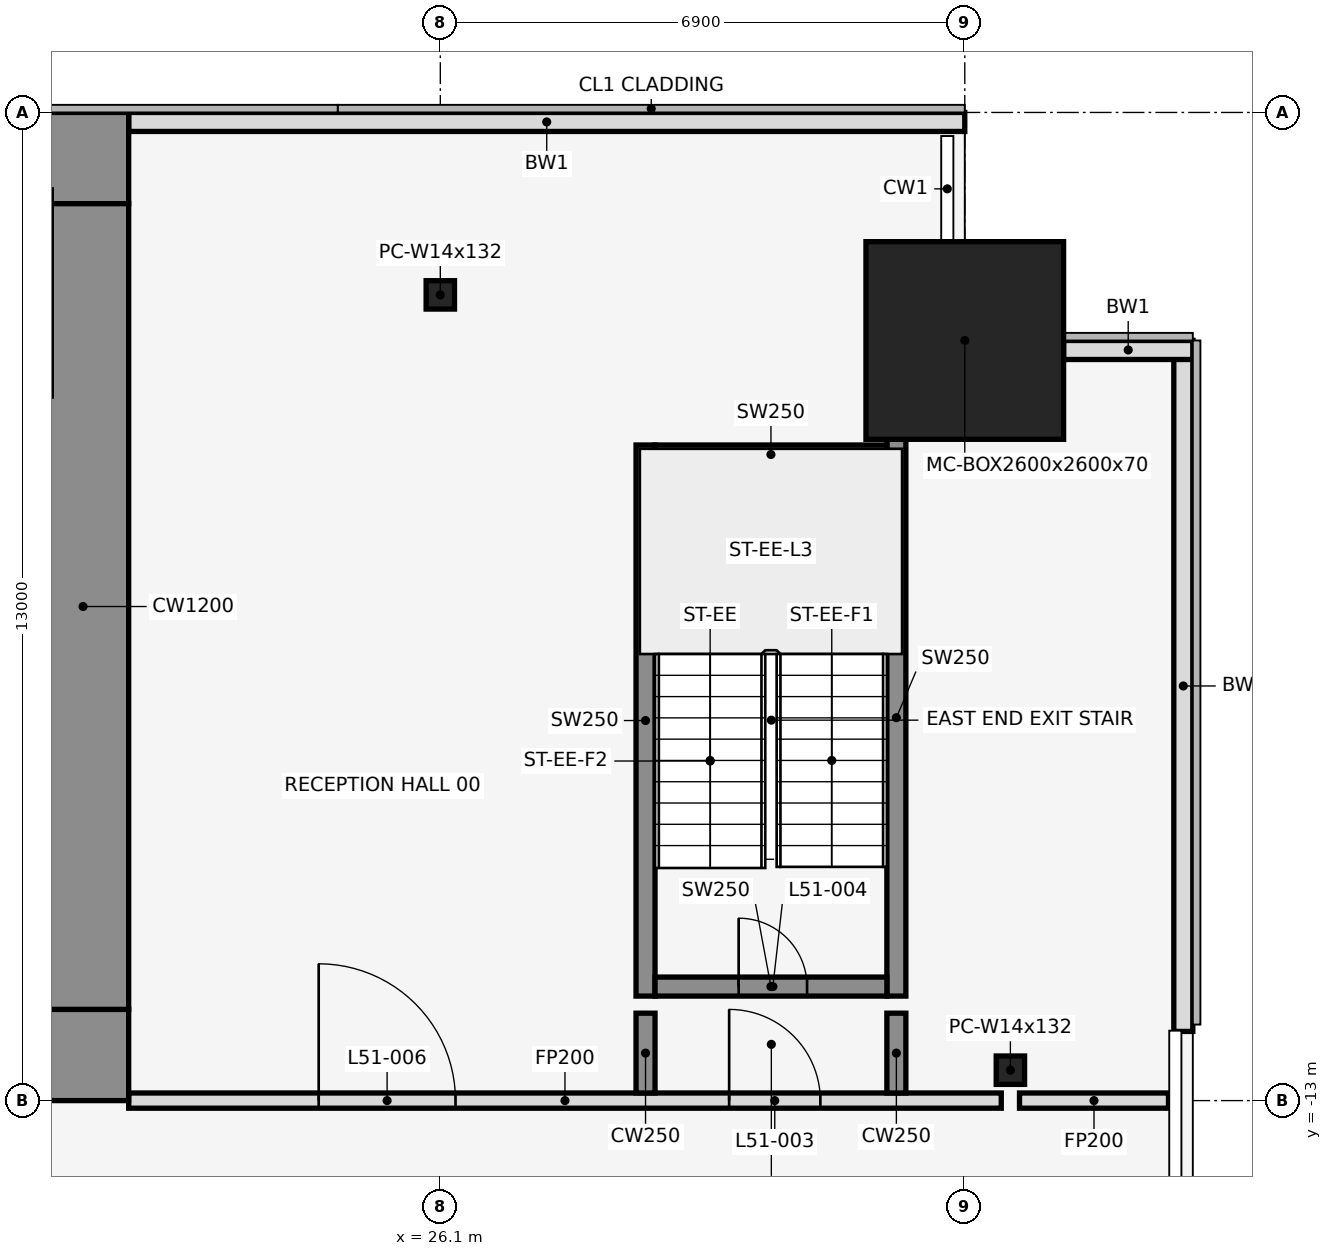
"""IFC4 building model, lengths in metres.
Left out: names, types, materials, properties, quantities, classifications, styles, units other than length and angle.
Written with IfcOpenShell. Run it as: python <this file> out.ifc"""

import sys

from ifc_helpers import new_model, si_unit, direction, frame, frame_2d, origin, origin_2d, place, context, subcontext, project, spatial, rectangle, hollow_rectangle, i_section, extrude, element, fill, save


model = new_model("IFC4")
c1 = context("Model", 3, precision=1e-05, world=origin(), true_north=direction((0.0, 1.0)))
c2 = subcontext(c1, "Body", "Model", "MODEL_VIEW")
j1 = project(units=[si_unit("LENGTHUNIT", "METRE"), si_unit("PLANEANGLEUNIT", "RADIAN")], contexts=[c1])
p1 = place(None, origin())
s1 = spatial("IfcSite", under=j1, at=p1, CompositionType="ELEMENT")
p2 = place(p1, origin())
s2 = spatial("IfcBuilding", under=s1, at=p2, CompositionType="ELEMENT")
p3 = place(p2, frame((0.0, 0.0, 227.8)))
s3 = spatial("IfcBuildingStorey", under=s2, at=p3, CompositionType="ELEMENT", Elevation=227.8)
p4 = place(p3, frame((26.1, -2.4, 0.0), z_axis=(0.0, 0.0, 1.0), x_axis=(1.0, 0.0, 0.0)))
e1 = element("IfcColumn", 1, at=p4, inside=s3, PredefinedType="COLUMN", context=c2, shape_type="SweptSolid", body=[
    extrude(i_section(OverallWidth=0.373, OverallDepth=0.373, WebThickness=0.016, FlangeThickness=0.026, at=origin_2d()), origin(), (0.0, 0.0, 1.0), 4.1),
])
p5 = place(p3, frame((33.0, -3.0, 0.0), z_axis=(0.0, 0.0, 1.0), x_axis=(1.0, 0.0, 0.0)))
e2 = element("IfcColumn", 2, at=p5, inside=s3, PredefinedType="COLUMN", context=c2, shape_type="SweptSolid", body=[
    extrude(hollow_rectangle(XDim=2.6, YDim=2.6, WallThickness=0.07, at=origin_2d()), origin(), (0.0, 0.0, 1.0), 4.1),
])
p6 = place(p3, frame((33.6, -12.6, 0.0), z_axis=(0.0, 0.0, 1.0), x_axis=(1.0, 0.0, 0.0)))
e3 = element("IfcColumn", 3, at=p6, inside=s3, PredefinedType="COLUMN", context=c2, shape_type="SweptSolid", body=[
    extrude(i_section(OverallWidth=0.373, OverallDepth=0.373, WebThickness=0.016, FlangeThickness=0.026, at=origin_2d()), origin(), (0.0, 0.0, 1.0), 4.1),
])
p7 = place(p3, frame((33.0, -0.125, 0.0), z_axis=(0.0, 0.0, 1.0), x_axis=(-1.0, 0.0, 0.0)))
e4 = element("IfcWall", 4, at=p7, inside=s3, PredefinedType="STANDARD", context=c2, shape_type="SweptSolid", body=[
    extrude(rectangle(XDim=11.0, YDim=0.25, at=frame_2d((5.5, 0.0))), origin(), (0.0, 0.0, 1.0), 3.95),
])
p8 = place(p3, frame((35.875, -12.09, 0.0), z_axis=(0.0, 0.0, 1.0), x_axis=(0.0, 1.0, 0.0)))
e5 = element("IfcWall", 5, at=p8, inside=s3, PredefinedType="STANDARD", context=c2, shape_type="SweptSolid", body=[
    extrude(rectangle(XDim=9.09, YDim=0.25, at=frame_2d((4.545, 0.0))), origin(), (0.0, 0.0, 1.0), 3.95),
])
p9 = place(p3, frame((36.0, -3.125, 0.0), z_axis=(0.0, 0.0, 1.0), x_axis=(-1.0, 0.0, 0.0)))
e6 = element("IfcWall", 6, at=p9, inside=s3, PredefinedType="STANDARD", context=c2, shape_type="SweptSolid", body=[
    extrude(rectangle(XDim=1.7, YDim=0.25, at=frame_2d((0.85, 0.0))), origin(), (0.0, 0.0, 1.0), 3.95),
])
p10 = place(p3, frame((28.8, -11.625, 0.0), z_axis=(0.0, 0.0, 1.0), x_axis=(0.0, 1.0, 0.0)))
e7 = element("IfcWall", 7, at=p10, inside=s3, PredefinedType="SHEAR", context=c2, shape_type="SweptSolid", body=[
    extrude(rectangle(XDim=7.25, YDim=0.25, at=frame_2d((3.625, 0.0))), origin(), (0.0, 0.0, 1.0), 4.1),
])
p11 = place(p3, frame((32.1, -11.625, 0.0), z_axis=(0.0, 0.0, 1.0), x_axis=(0.0, 1.0, 0.0)))
e8 = element("IfcWall", 8, at=p11, inside=s3, PredefinedType="SHEAR", context=c2, shape_type="SweptSolid", body=[
    extrude(rectangle(XDim=7.325, YDim=0.25, at=frame_2d((3.663, 0.0))), origin(), (0.0, 0.0, 1.0), 4.1),
])
p12 = place(p3, frame((28.925, -11.5, 0.0), z_axis=(0.0, 0.0, 1.0), x_axis=(1.0, 0.0, 0.0)))
e9 = element("IfcWall", 9, at=p12, inside=s3, PredefinedType="SHEAR", context=c2, shape_type="SweptSolid", body=[
    extrude(rectangle(XDim=3.05, YDim=0.25, at=frame_2d((1.525, 0.0))), origin(), (0.0, 0.0, 1.0), 4.1),
])
p13 = place(p12, frame((1.1, 0.0, 0.0)))
e10 = element("IfcOpeningElement", 10, at=p13, cuts=e9, PredefinedType="OPENING", context=c2, shape_type="SweptSolid", body=[
    extrude(rectangle(XDim=0.9, YDim=2.1, at=frame_2d((0.45, 1.05))), frame((0.0, 0.137, 0.0), z_axis=(0.0, -1.0, 0.0), x_axis=(1.0, 0.0, 0.0)), (0.0, 0.0, 1.0), 0.274),
])
p14 = place(p3, frame((28.925, -4.5, 0.0), z_axis=(0.0, 0.0, 1.0), x_axis=(1.0, 0.0, 0.0)))
e11 = element("IfcWall", 11, at=p14, inside=s3, PredefinedType="SHEAR", context=c2, shape_type="SweptSolid", body=[
    extrude(rectangle(XDim=3.05, YDim=0.25, at=frame_2d((1.525, 0.0))), origin(), (0.0, 0.0, 1.0), 4.1),
])
p15 = place(p3, frame((22.0, -13.0, 0.0), z_axis=(0.0, 0.0, 1.0), x_axis=(1.0, 0.0, 0.0)))
e12 = element("IfcWall", 12, at=p15, inside=s3, PredefinedType="PARTITIONING", context=c2, shape_type="SweptSolid", body=[
    extrude(rectangle(XDim=11.48, YDim=0.2, at=frame_2d((5.74, 0.0))), origin(), (0.0, 0.0, 1.0), 2.84),
])
p16 = place(p15, frame((7.9, 0.0, 0.0)))
e13 = element("IfcOpeningElement", 13, at=p16, cuts=e12, PredefinedType="OPENING", context=c2, shape_type="SweptSolid", body=[
    extrude(rectangle(XDim=1.2, YDim=2.1, at=frame_2d((0.6, 1.05))), frame((0.0, 0.112, 0.0), z_axis=(0.0, -1.0, 0.0), x_axis=(1.0, 0.0, 0.0)), (0.0, 0.0, 1.0), 0.224),
])
p17 = place(p15, frame((2.5, 0.0, 0.0)))
e14 = element("IfcOpeningElement", 14, at=p17, cuts=e12, PredefinedType="OPENING", context=c2, shape_type="SweptSolid", body=[
    extrude(rectangle(XDim=1.8, YDim=2.1, at=frame_2d((0.9, 1.05))), frame((0.0, 0.112, 0.0), z_axis=(0.0, -1.0, 0.0), x_axis=(1.0, 0.0, 0.0)), (0.0, 0.0, 1.0), 0.224),
])
p18 = place(p3, frame((33.72, -13.0, 0.0), z_axis=(0.0, 0.0, 1.0), x_axis=(1.0, 0.0, 0.0)))
e15 = element("IfcWall", 15, at=p18, inside=s3, PredefinedType="PARTITIONING", context=c2, shape_type="SweptSolid", body=[
    extrude(rectangle(XDim=1.96, YDim=0.2, at=frame_2d((0.98, 0.0))), origin(), (0.0, 0.0, 1.0), 2.84),
])
for number, where, z_axis, x_axis in (
    (16, (28.8, -12.9, 0.0), (0.0, 0.0, 1.0), (0.0, 1.0, 0.0)),
    (17, (32.1, -12.9, 0.0), (0.0, 0.0, 1.0), (0.0, 1.0, 0.0)),
):
    element("IfcWall", number, at=place(p3, frame(where, z_axis=z_axis, x_axis=x_axis)), inside=s3, PredefinedType="SHEAR", context=c2, shape_type="SweptSolid", body=[
        extrude(rectangle(XDim=1.05, YDim=0.25, at=frame_2d((0.525, 0.0))), origin(), (0.0, 0.0, 1.0), 4.1),
    ])
p19 = place(p3, frame((-22.0, -0.6, 0.0), z_axis=(0.0, 0.0, 1.0), x_axis=(1.0, 0.0, 0.0)))
e18 = element("IfcWall", 18, at=p19, inside=s3, PredefinedType="SHEAR", context=c2, shape_type="SweptSolid", body=[
    extrude(rectangle(XDim=44.0, YDim=1.2, at=frame_2d((22.0, 0.0))), origin(), (0.0, 0.0, 1.0), 4.1),
])
p20 = place(p19, frame((18.55, 0.0, 0.0)))
e19 = element("IfcOpeningElement", 19, at=p20, cuts=e18, PredefinedType="OPENING", context=c2, shape_type="SweptSolid", body=[
    extrude(rectangle(XDim=0.9, YDim=2.1, at=frame_2d((0.45, 1.05))), frame((0.0, 0.612, 0.0), z_axis=(0.0, -1.0, 0.0), x_axis=(1.0, 0.0, 0.0)), (0.0, 0.0, 1.0), 1.224),
])
p21 = place(p19, frame((24.55, 0.0, 0.0)))
e20 = element("IfcOpeningElement", 20, at=p21, cuts=e18, PredefinedType="OPENING", context=c2, shape_type="SweptSolid", body=[
    extrude(rectangle(XDim=0.9, YDim=2.1, at=frame_2d((0.45, 1.05))), frame((0.0, 0.612, 0.0), z_axis=(0.0, -1.0, 0.0), x_axis=(1.0, 0.0, 0.0)), (0.0, 0.0, 1.0), 1.224),
])
p22 = place(p3, frame((-22.0, -12.4, 0.0), z_axis=(0.0, 0.0, 1.0), x_axis=(1.0, 0.0, 0.0)))
e21 = element("IfcWall", 21, at=p22, inside=s3, PredefinedType="SHEAR", context=c2, shape_type="SweptSolid", body=[
    extrude(rectangle(XDim=44.0, YDim=1.2, at=frame_2d((22.0, 0.0))), origin(), (0.0, 0.0, 1.0), 4.1),
])
p23 = place(p22, frame((2.2, 0.0, 0.0)))
e22 = element("IfcOpeningElement", 22, at=p23, cuts=e21, PredefinedType="OPENING", context=c2, shape_type="SweptSolid", body=[
    extrude(rectangle(XDim=1.2, YDim=2.1, at=frame_2d((0.6, 1.05))), frame((0.0, 0.612, 0.0), z_axis=(0.0, -1.0, 0.0), x_axis=(1.0, 0.0, 0.0)), (0.0, 0.0, 1.0), 1.224),
])
p24 = place(p22, frame((21.4, 0.0, 0.0)))
e23 = element("IfcOpeningElement", 23, at=p24, cuts=e21, PredefinedType="OPENING", context=c2, shape_type="SweptSolid", body=[
    extrude(rectangle(XDim=1.2, YDim=2.1, at=frame_2d((0.6, 1.05))), frame((0.0, 0.612, 0.0), z_axis=(0.0, -1.0, 0.0), x_axis=(1.0, 0.0, 0.0)), (0.0, 0.0, 1.0), 1.224),
])
p25 = place(p22, frame((40.6, 0.0, 0.0)))
e24 = element("IfcOpeningElement", 24, at=p25, cuts=e21, PredefinedType="OPENING", context=c2, shape_type="SweptSolid", body=[
    extrude(rectangle(XDim=1.2, YDim=2.1, at=frame_2d((0.6, 1.05))), frame((0.0, 0.612, 0.0), z_axis=(0.0, -1.0, 0.0), x_axis=(1.0, 0.0, 0.0)), (0.0, 0.0, 1.0), 1.224),
])
p26 = place(p22, frame((16.0, 0.0, 0.0)))
e25 = element("IfcOpeningElement", 25, at=p26, cuts=e21, PredefinedType="OPENING", context=c2, shape_type="SweptSolid", body=[
    extrude(rectangle(XDim=1.8, YDim=2.1, at=frame_2d((0.9, 1.05))), frame((0.0, 0.612, 0.0), z_axis=(0.0, -1.0, 0.0), x_axis=(1.0, 0.0, 0.0)), (0.0, 0.0, 1.0), 1.224),
])
p27 = place(p22, frame((6.3, 0.0, 0.0)))
e26 = element("IfcOpeningElement", 26, at=p27, cuts=e21, PredefinedType="OPENING", context=c2, shape_type="SweptSolid", body=[
    extrude(rectangle(XDim=1.2, YDim=2.1, at=frame_2d((0.6, 1.05))), frame((0.0, 0.612, 0.0), z_axis=(0.0, -1.0, 0.0), x_axis=(1.0, 0.0, 0.0)), (0.0, 0.0, 1.0), 1.224),
])
p28 = place(p22, frame((26.2, 0.0, 0.0)))
e27 = element("IfcOpeningElement", 27, at=p28, cuts=e21, PredefinedType="OPENING", context=c2, shape_type="SweptSolid", body=[
    extrude(rectangle(XDim=1.8, YDim=2.1, at=frame_2d((0.9, 1.05))), frame((0.0, 0.612, 0.0), z_axis=(0.0, -1.0, 0.0), x_axis=(1.0, 0.0, 0.0)), (0.0, 0.0, 1.0), 1.224),
])
p29 = place(p22, frame((36.5, 0.0, 0.0)))
e28 = element("IfcOpeningElement", 28, at=p29, cuts=e21, PredefinedType="OPENING", context=c2, shape_type="SweptSolid", body=[
    extrude(rectangle(XDim=1.2, YDim=2.1, at=frame_2d((0.6, 1.05))), frame((0.0, 0.612, 0.0), z_axis=(0.0, -1.0, 0.0), x_axis=(1.0, 0.0, 0.0)), (0.0, 0.0, 1.0), 1.224),
])
p30 = place(p3, frame((21.4, -11.8, 0.0), z_axis=(0.0, 0.0, 1.0), x_axis=(0.0, 1.0, 0.0)))
e29 = element("IfcWall", 29, at=p30, inside=s3, PredefinedType="SHEAR", context=c2, shape_type="SweptSolid", body=[
    extrude(rectangle(XDim=10.6, YDim=1.2, at=frame_2d((5.3, 0.0))), origin(), (0.0, 0.0, 1.0), 4.1),
])
p31 = place(p16, origin())
e30 = element("IfcDoor", 30, at=p31, inside=s3, OperationType="SINGLE_SWING_RIGHT", PredefinedType="DOOR", context=c2, shape_type="SweptSolid", body=[
    extrude(rectangle(XDim=1.2, YDim=2.1, at=frame_2d((0.6, 1.05))), frame((0.0, 0.025, 0.0), z_axis=(0.0, -1.0, 0.0), x_axis=(1.0, 0.0, 0.0)), (0.0, 0.0, 1.0), 0.05),
])
fill(e13, e30)
p32 = place(p13, origin())
e31 = element("IfcDoor", 31, at=p32, inside=s3, OperationType="SINGLE_SWING_LEFT", PredefinedType="DOOR", context=c2, shape_type="SweptSolid", body=[
    extrude(rectangle(XDim=0.9, YDim=2.1, at=frame_2d((0.45, 1.05))), frame((0.0, 0.025, 0.0), z_axis=(0.0, -1.0, 0.0), x_axis=(1.0, 0.0, 0.0)), (0.0, 0.0, 1.0), 0.05),
])
fill(e10, e31)
p33 = place(p17, origin())
e32 = element("IfcDoor", 32, at=p33, inside=s3, OperationType="SINGLE_SWING_LEFT", PredefinedType="DOOR", context=c2, shape_type="SweptSolid", body=[
    extrude(rectangle(XDim=1.8, YDim=2.1, at=frame_2d((0.9, 1.05))), frame((0.0, 0.025, 0.0), z_axis=(0.0, -1.0, 0.0), x_axis=(1.0, 0.0, 0.0)), (0.0, 0.0, 1.0), 0.05),
])
fill(e14, e32)
save(model, sys.argv[1])
